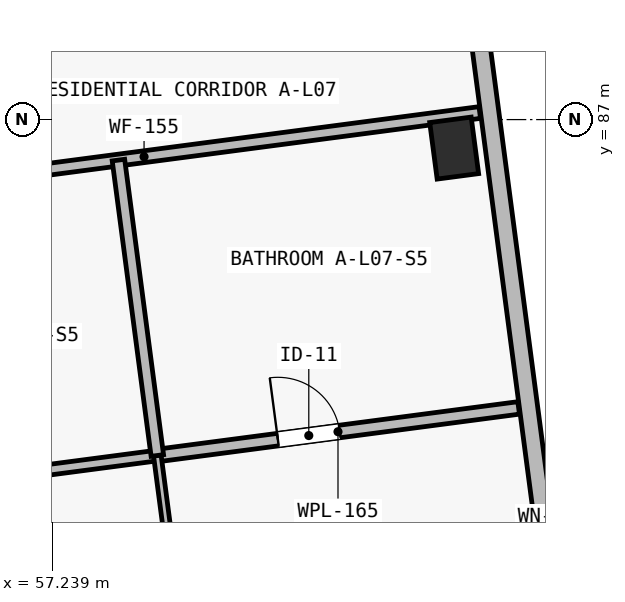
"""IFC4 building model, lengths in metres.
Left out: names, types, materials, properties, quantities, classifications, styles, units other than length and angle.
Written with IfcOpenShell. Run it as: python <this file> out.ifc"""

import sys

from ifc_helpers import new_model, si_unit, direction, frame, frame_2d, origin, origin_2d, place, context, subcontext, project, spatial, rectangle, extrude, element, fill, save


model = new_model("IFC4")
c1 = context("Model", 3, precision=1e-05, world=origin(), true_north=direction((0.0, 1.0)))
c2 = subcontext(c1, "Body", "Model", "MODEL_VIEW")
j1 = project(units=[si_unit("LENGTHUNIT", "METRE"), si_unit("PLANEANGLEUNIT", "RADIAN")], contexts=[c1])
p1 = place(None, origin())
s1 = spatial("IfcSite", under=j1, at=p1, CompositionType="ELEMENT")
p2 = place(p1, origin())
s2 = spatial("IfcBuilding", under=s1, at=p2, CompositionType="ELEMENT")
p3 = place(p2, frame((0.0, 0.0, 24.65)))
s3 = spatial("IfcBuildingStorey", under=s2, at=p3, CompositionType="ELEMENT", Elevation=24.65)
p4 = place(p3, frame((62.53, 86.625, 0.0), z_axis=(0.0, 0.0, 1.0), x_axis=(0.991444861374, 0.13052619222, 0.0)))
e1 = element("IfcColumn", 1, at=p4, inside=s3, PredefinedType="COLUMN", context=c2, shape_type="SweptSolid", body=[
    extrude(rectangle(XDim=0.55, YDim=0.75, at=origin_2d()), origin(), (0.0, 0.0, 1.0), 3.25),
])
p5 = place(p3, frame((61.39, 99.31, 0.0), z_axis=(0.0, 0.0, 1.0), x_axis=(0.13052411616, -0.99144513469, 0.0)))
e2 = element("IfcWall", 2, at=p5, inside=s3, PredefinedType="SOLIDWALL", context=c2, shape_type="SweptSolid", body=[
    extrude(rectangle(XDim=21.05, YDim=0.24, at=frame_2d((10.525, 0.0))), origin(), (0.0, 0.0, 1.0), 3.0),
])
p6 = place(p5, frame((17.72, 0.0, 0.45)))
e3 = element("IfcOpeningElement", 3, at=p6, cuts=e2, PredefinedType="OPENING", context=c2, shape_type="SweptSolid", body=[
    extrude(rectangle(XDim=0.7, YDim=2.36, at=frame_2d((0.35, 1.18))), frame((0.0, 0.135, 0.0), z_axis=(0.0, -1.0, 0.0), x_axis=(1.0, 0.0, 0.0)), (0.0, 0.0, 1.0), 0.27),
])
p7 = place(p3, frame((54.033, 85.93, 0.0), z_axis=(0.0, 0.0, 1.0), x_axis=(0.991443380249, 0.130537441989, 0.0)))
e4 = element("IfcWall", 4, at=p7, inside=s3, PredefinedType="PARTITIONING", context=c2, shape_type="SweptSolid", body=[
    extrude(rectangle(XDim=8.91, YDim=0.155, at=frame_2d((4.455, 0.0))), origin(), (0.0, 0.0, 1.0), 2.97),
])
p8 = place(p7, frame((1.605, 0.0, 0.0)))
e5 = element("IfcOpeningElement", 5, at=p8, cuts=e4, PredefinedType="OPENING", context=c2, shape_type="SweptSolid", body=[
    extrude(rectangle(XDim=0.98, YDim=2.15, at=frame_2d((0.49, 1.075))), frame((0.0, 0.093, 0.0), z_axis=(0.0, -1.0, 0.0), x_axis=(1.0, 0.0, 0.0)), (0.0, 0.0, 1.0), 0.185),
])
p9 = place(p3, frame((54.376, 82.021, 0.0), z_axis=(0.0, 0.0, 1.0), x_axis=(0.991452356241, 0.130469250419, 0.0)))
e6 = element("IfcWall", 6, at=p9, inside=s3, PredefinedType="PARTITIONING", context=c2, shape_type="SweptSolid", body=[
    extrude(rectangle(XDim=4.285, YDim=0.14, at=frame_2d((2.143, 0.0))), origin(), (0.0, 0.0, 1.0), 2.97),
])
p10 = place(p9, frame((1.825, 0.0, 0.0)))
e7 = element("IfcOpeningElement", 7, at=p10, cuts=e6, PredefinedType="OPENING", context=c2, shape_type="SweptSolid", body=[
    extrude(rectangle(XDim=0.9, YDim=2.1, at=frame_2d((0.45, 1.05))), frame((0.0, 0.085, 0.0), z_axis=(0.0, -1.0, 0.0), x_axis=(1.0, 0.0, 0.0)), (0.0, 0.0, 1.0), 0.17),
])
p11 = place(p3, frame((58.625, 82.581, 0.0), z_axis=(0.0, 0.0, 1.0), x_axis=(0.991441813226, 0.130549343114, 0.0)))
e8 = element("IfcWall", 8, at=p11, inside=s3, PredefinedType="PLUMBINGWALL", context=c2, shape_type="SweptSolid", body=[
    extrude(rectangle(XDim=4.795, YDim=0.165, at=frame_2d((2.397, 0.0))), origin(), (0.0, 0.0, 1.0), 2.97),
])
p12 = place(p11, frame((1.6, 0.0, 0.0)))
e9 = element("IfcOpeningElement", 9, at=p12, cuts=e8, PredefinedType="OPENING", context=c2, shape_type="SweptSolid", body=[
    extrude(rectangle(XDim=0.82, YDim=2.08, at=frame_2d((0.41, 1.04))), frame((0.0, 0.097, 0.0), z_axis=(0.0, -1.0, 0.0), x_axis=(1.0, 0.0, 0.0)), (0.0, 0.0, 1.0), 0.195),
])
p13 = place(p3, frame((59.237, 77.931, 0.0), z_axis=(0.0, 0.0, 1.0), x_axis=(-0.13050972446, 0.991447029256, 0.0)))
e10 = element("IfcWall", 10, at=p13, inside=s3, PredefinedType="PARTITIONING", context=c2, shape_type="SweptSolid", body=[
    extrude(rectangle(XDim=4.69, YDim=0.1, at=frame_2d((2.345, 0.0))), origin(), (0.0, 0.0, 1.0), 2.97),
])
p14 = place(p13, frame((1.35, 0.0, 0.0)))
e11 = element("IfcOpeningElement", 11, at=p14, cuts=e10, PredefinedType="OPENING", context=c2, shape_type="SweptSolid", body=[
    extrude(rectangle(XDim=0.88, YDim=2.1, at=frame_2d((0.44, 1.05))), frame((0.0, 0.065, 0.0), z_axis=(0.0, -1.0, 0.0), x_axis=(1.0, 0.0, 0.0)), (0.0, 0.0, 1.0), 0.13),
])
p15 = place(p3, frame((58.625, 82.581, 0.0), z_axis=(0.0, 0.0, 1.0), x_axis=(-0.130539898676, 0.991443056788, 0.0)))
e12 = element("IfcWall", 12, at=p15, inside=s3, PredefinedType="PLUMBINGWALL", context=c2, shape_type="SweptSolid", body=[
    extrude(rectangle(XDim=3.92, YDim=0.165, at=frame_2d((1.96, 0.0))), origin(), (0.0, 0.0, 1.0), 2.97),
])
p16 = place(p6, origin())
e13 = element("IfcWindow", 13, at=p16, inside=s3, PartitioningType="SINGLE_PANEL", PredefinedType="WINDOW", context=c2, shape_type="SweptSolid", body=[
    extrude(rectangle(XDim=0.7, YDim=2.36, at=frame_2d((0.35, 1.18))), frame((0.0, 0.03, 0.0), z_axis=(0.0, -1.0, 0.0), x_axis=(1.0, 0.0, 0.0)), (0.0, 0.0, 1.0), 0.06),
])
fill(e3, e13)
p17 = place(p12, origin())
e14 = element("IfcDoor", 14, at=p17, inside=s3, OperationType="SINGLE_SWING_LEFT", PredefinedType="DOOR", context=c2, shape_type="SweptSolid", body=[
    extrude(rectangle(XDim=0.82, YDim=2.08, at=frame_2d((0.41, 1.04))), frame((0.0, 0.025, 0.0), z_axis=(0.0, -1.0, 0.0), x_axis=(1.0, 0.0, 0.0)), (0.0, 0.0, 1.0), 0.05),
])
fill(e9, e14)
save(model, sys.argv[1])
